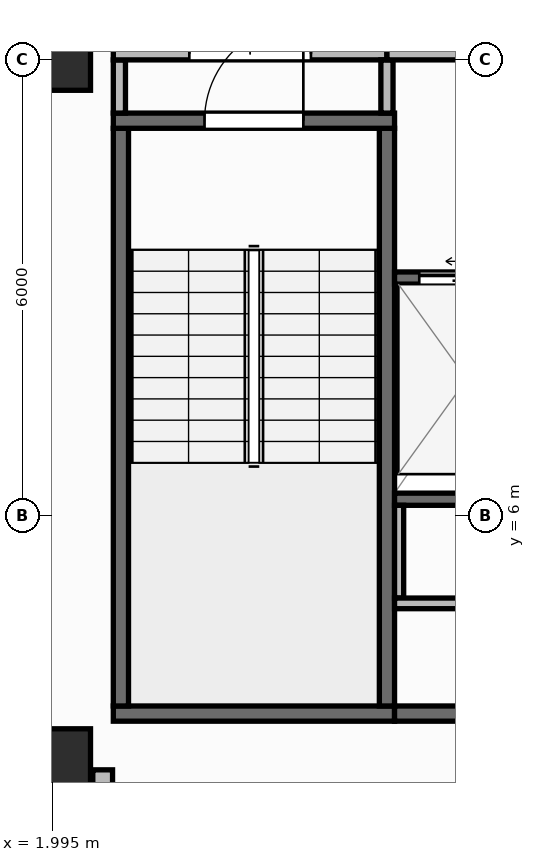
"""IFC4 building model, lengths in metres.
Left out: names, types, materials, properties, quantities, classifications, styles, units other than length and angle.
Written with IfcOpenShell. Run it as: python <this file> out.ifc"""

import sys

from ifc_helpers import new_model, si_unit, direction, frame, frame_2d, origin, origin_2d, place, context, subcontext, project, spatial, rectangle, extrude, element, fill, save


model = new_model("IFC4")
c1 = context("Model", 3, precision=1e-05, world=origin(), true_north=direction((0.0, 1.0)))
c2 = subcontext(c1, "Body", "Model", "MODEL_VIEW")
j1 = project(units=[si_unit("LENGTHUNIT", "METRE"), si_unit("PLANEANGLEUNIT", "RADIAN")], contexts=[c1])
p1 = place(None, origin())
s1 = spatial("IfcSite", under=j1, at=p1, CompositionType="ELEMENT")
p2 = place(p1, origin())
s2 = spatial("IfcBuilding", under=s1, at=p2, CompositionType="ELEMENT")
p3 = place(p2, frame((0.0, 0.0, 248.65)))
s3 = spatial("IfcBuildingStorey", under=s2, at=p3, CompositionType="ELEMENT", Elevation=248.65)
for number, where, z_axis, x_axis in (
    (1, (2.1, 2.8, 0.0), (0.0, 0.0, 1.0), (1.0, 0.0, 0.0)),
    (2, (2.1, 12.0, 0.0), (0.0, 0.0, 1.0), (1.0, 0.0, 0.0)),
):
    element("IfcColumn", number, at=place(p3, frame(where, z_axis=z_axis, x_axis=x_axis)), inside=s3, PredefinedType="COLUMN", context=c2, shape_type="SweptSolid", body=[
        extrude(rectangle(XDim=0.8, YDim=0.8, at=origin_2d()), origin(), (0.0, 0.0, 1.0), 3.95),
    ])
p4 = place(p3, frame((2.66, 2.66, 0.0), z_axis=(0.0, 0.0, 1.0), x_axis=(0.0, -1.0, 0.0)))
e3 = element("IfcWall", 3, at=p4, inside=s3, PredefinedType="STANDARD", context=c2, shape_type="SweptSolid", body=[
    extrude(rectangle(XDim=2.486, YDim=0.26, at=frame_2d((1.243, 0.0))), origin(), (0.0, 0.0, 1.0), 3.71),
])
p5 = place(p3, frame((2.66, 0.174, 0.0), z_axis=(0.0, 0.0, 1.0), x_axis=(0.996611813627, 0.082248969229, 0.0)))
e4 = element("IfcWall", 4, at=p5, inside=s3, PredefinedType="STANDARD", context=c2, shape_type="SweptSolid", body=[
    extrude(rectangle(XDim=41.019, YDim=0.26, at=frame_2d((20.51, 0.0))), origin(), (0.0, 0.0, 1.0), 3.71),
])
p6 = place(p5, frame((19.31, 0.0, 0.9)))
e5 = element("IfcOpeningElement", 5, at=p6, cuts=e4, PredefinedType="OPENING", context=c2, shape_type="SweptSolid", body=[
    extrude(rectangle(XDim=2.4, YDim=1.65, at=frame_2d((1.2, 0.825))), frame((0.0, 0.14, 0.0), z_axis=(0.0, -1.0, 0.0), x_axis=(1.0, 0.0, 0.0)), (0.0, 0.0, 1.0), 0.28),
])
p7 = place(p3, frame((2.8, 3.4, 0.0), z_axis=(0.0, 0.0, 1.0), x_axis=(1.0, 0.0, 0.0)))
e6 = element("IfcWall", 6, at=p7, inside=s3, PredefinedType="SHEAR", context=c2, shape_type="SweptSolid", body=[
    extrude(rectangle(XDim=3.7, YDim=0.2, at=frame_2d((1.85, 0.0))), origin(), (0.0, 0.0, 1.0), 3.71),
])
for number, where, z_axis, x_axis in (
    (7, (2.9, 3.5, 0.0), (0.0, 0.0, 1.0), (0.0, 1.0, 0.0)),
    (8, (6.4, 3.5, 0.0), (0.0, 0.0, 1.0), (0.0, 1.0, 0.0)),
):
    element("IfcWall", number, at=place(p3, frame(where, z_axis=z_axis, x_axis=x_axis)), inside=s3, PredefinedType="SHEAR", context=c2, shape_type="SweptSolid", body=[
        extrude(rectangle(XDim=7.6, YDim=0.2, at=frame_2d((3.8, 0.0))), origin(), (0.0, 0.0, 1.0), 3.71),
    ])
p8 = place(p3, frame((2.8, 11.2, 0.0), z_axis=(0.0, 0.0, 1.0), x_axis=(1.0, 0.0, 0.0)))
e9 = element("IfcWall", 9, at=p8, inside=s3, PredefinedType="SHEAR", context=c2, shape_type="SweptSolid", body=[
    extrude(rectangle(XDim=3.7, YDim=0.2, at=frame_2d((1.85, 0.0))), origin(), (0.0, 0.0, 1.0), 3.71),
])
p9 = place(p8, frame((1.2, 0.0, 0.0)))
e10 = element("IfcOpeningElement", 10, at=p9, cuts=e9, PredefinedType="OPENING", context=c2, shape_type="SweptSolid", body=[
    extrude(rectangle(XDim=1.3, YDim=2.15, at=frame_2d((0.65, 1.075))), frame((0.0, 0.11, 0.0), z_axis=(0.0, -1.0, 0.0), x_axis=(1.0, 0.0, 0.0)), (0.0, 0.0, 1.0), 0.22),
])
p10 = place(p3, frame((6.5, 3.4, 0.0), z_axis=(0.0, 0.0, 1.0), x_axis=(1.0, 0.0, 0.0)))
e11 = element("IfcWall", 11, at=p10, inside=s3, PredefinedType="SHEAR", context=c2, shape_type="SweptSolid", body=[
    extrude(rectangle(XDim=13.7, YDim=0.2, at=frame_2d((6.85, 0.0))), origin(), (0.0, 0.0, 1.0), 3.71),
])
p11 = place(p3, frame((6.5, 6.22, 0.0), z_axis=(0.0, 0.0, 1.0), x_axis=(1.0, 0.0, 0.0)))
e12 = element("IfcWall", 12, at=p11, inside=s3, PredefinedType="SHEAR", context=c2, shape_type="SweptSolid", body=[
    extrude(rectangle(XDim=12.11, YDim=0.16, at=frame_2d((6.055, 0.0))), origin(), (0.0, 0.0, 1.0), 3.71),
])
p12 = place(p3, frame((6.5, 9.13, 0.0), z_axis=(0.0, 0.0, 1.0), x_axis=(1.0, 0.0, 0.0)))
e13 = element("IfcWall", 13, at=p12, inside=s3, PredefinedType="SHEAR", context=c2, shape_type="SweptSolid", body=[
    extrude(rectangle(XDim=1.975, YDim=0.16, at=frame_2d((0.988, 0.0))), origin(), (0.0, 0.0, 1.0), 3.71),
])
p13 = place(p12, frame((0.325, 0.0, 0.0)))
e14 = element("IfcOpeningElement", 14, at=p13, cuts=e13, PredefinedType="OPENING", context=c2, shape_type="SweptSolid", body=[
    extrude(rectangle(XDim=1.25, YDim=2.15, at=frame_2d((0.625, 1.075))), frame((0.0, 0.09, 0.0), z_axis=(0.0, -1.0, 0.0), x_axis=(1.0, 0.0, 0.0)), (0.0, 0.0, 1.0), 0.18),
])
p14 = place(p3, frame((6.56, 4.92, 0.0), z_axis=(0.0, 0.0, 1.0), x_axis=(0.0, 1.0, 0.0)))
e15 = element("IfcWall", 15, at=p14, inside=s3, PredefinedType="PARTITIONING", context=c2, shape_type="SweptSolid", body=[
    extrude(rectangle(XDim=1.22, YDim=0.12, at=frame_2d((0.61, 0.0))), origin(), (0.0, 0.0, 1.0), 3.71),
])
p15 = place(p3, frame((6.5, 4.85, 0.0), z_axis=(0.0, 0.0, 1.0), x_axis=(1.0, 0.0, 0.0)))
e16 = element("IfcWall", 16, at=p15, inside=s3, PredefinedType="PARTITIONING", context=c2, shape_type="SweptSolid", body=[
    extrude(rectangle(XDim=12.1, YDim=0.14, at=frame_2d((6.05, 0.0))), origin(), (0.0, 0.0, 1.0), 3.71),
])
p16 = place(p15, frame((5.5, 0.0, 0.0)))
e17 = element("IfcOpeningElement", 17, at=p16, cuts=e16, PredefinedType="OPENING", context=c2, shape_type="SweptSolid", body=[
    extrude(rectangle(XDim=1.1, YDim=2.1, at=frame_2d((0.55, 1.05))), frame((0.0, 0.08, 0.0), z_axis=(0.0, -1.0, 0.0), x_axis=(1.0, 0.0, 0.0)), (0.0, 0.0, 1.0), 0.16),
])
p17 = place(p3, frame((2.88, 11.3, 0.0), z_axis=(0.0, 0.0, 1.0), x_axis=(0.0, 1.0, 0.0)))
e18 = element("IfcWall", 18, at=p17, inside=s3, PredefinedType="PARTITIONING", context=c2, shape_type="SweptSolid", body=[
    extrude(rectangle(XDim=0.7, YDim=0.16, at=frame_2d((0.35, 0.0))), origin(), (0.0, 0.0, 1.0), 3.71),
])
p18 = place(p3, frame((2.8, 12.08, 0.0), z_axis=(0.0, 0.0, 1.0), x_axis=(1.0, 0.0, 0.0)))
e19 = element("IfcWall", 19, at=p18, inside=s3, PredefinedType="PARTITIONING", context=c2, shape_type="SweptSolid", body=[
    extrude(rectangle(XDim=3.6, YDim=0.16, at=frame_2d((1.8, 0.0))), origin(), (0.0, 0.0, 1.0), 3.157),
])
p19 = place(p18, frame((1.0, 0.0, 0.0)))
e20 = element("IfcOpeningElement", 20, at=p19, cuts=e19, PredefinedType="OPENING", context=c2, shape_type="SweptSolid", body=[
    extrude(rectangle(XDim=1.6, YDim=2.05, at=frame_2d((0.8, 1.025))), frame((0.0, 0.09, 0.0), z_axis=(0.0, -1.0, 0.0), x_axis=(1.0, 0.0, 0.0)), (0.0, 0.0, 1.0), 0.18),
])
p20 = place(p3, frame((6.4, 11.3, 0.0), z_axis=(0.0, 0.0, 1.0), x_axis=(0.0, 1.0, 0.0)))
e21 = element("IfcWall", 21, at=p20, inside=s3, PredefinedType="PARTITIONING", context=c2, shape_type="SweptSolid", body=[
    extrude(rectangle(XDim=0.7, YDim=0.16, at=frame_2d((0.35, 0.0))), origin(), (0.0, 0.0, 1.0), 3.71),
])
p21 = place(p3, frame((6.4, 12.08, 0.0), z_axis=(0.0, 0.0, 1.0), x_axis=(1.0, 0.0, 0.0)))
e22 = element("IfcWall", 22, at=p21, inside=s3, PredefinedType="PARTITIONING", context=c2, shape_type="SweptSolid", body=[
    extrude(rectangle(XDim=6.18, YDim=0.16, at=frame_2d((3.09, 0.0))), origin(), (0.0, 0.0, 1.0), 3.157),
])
p22 = place(p21, frame((2.29, 0.0, 0.0)))
e23 = element("IfcOpeningElement", 23, at=p22, cuts=e22, PredefinedType="OPENING", context=c2, shape_type="SweptSolid", body=[
    extrude(rectangle(XDim=1.6, YDim=2.05, at=frame_2d((0.8, 1.025))), frame((0.0, 0.09, 0.0), z_axis=(0.0, -1.0, 0.0), x_axis=(1.0, 0.0, 0.0)), (0.0, 0.0, 1.0), 0.18),
])
p23 = place(p9, origin())
e24 = element("IfcDoor", 24, at=p23, inside=s3, OperationType="SINGLE_SWING_RIGHT", PredefinedType="DOOR", context=c2, shape_type="SweptSolid", body=[
    extrude(rectangle(XDim=1.3, YDim=2.15, at=frame_2d((0.65, 1.075))), frame((0.0, 0.025, 0.0), z_axis=(0.0, -1.0, 0.0), x_axis=(1.0, 0.0, 0.0)), (0.0, 0.0, 1.0), 0.05),
])
fill(e10, e24)
p24 = place(p13, origin())
e25 = element("IfcDoor", 25, at=p24, inside=s3, OperationType="SLIDING_TO_LEFT", PredefinedType="DOOR", context=c2, shape_type="SweptSolid", body=[
    extrude(rectangle(XDim=1.25, YDim=2.15, at=frame_2d((0.625, 1.075))), frame((0.0, 0.025, 0.0), z_axis=(0.0, -1.0, 0.0), x_axis=(1.0, 0.0, 0.0)), (0.0, 0.0, 1.0), 0.05),
])
fill(e14, e25)
p25 = place(p19, origin())
e26 = element("IfcDoor", 26, at=p25, inside=s3, OperationType="DOUBLE_DOOR_SINGLE_SWING", PredefinedType="DOOR", context=c2, shape_type="SweptSolid", body=[
    extrude(rectangle(XDim=1.6, YDim=2.05, at=frame_2d((0.8, 1.025))), frame((0.0, 0.025, 0.0), z_axis=(0.0, -1.0, 0.0), x_axis=(1.0, 0.0, 0.0)), (0.0, 0.0, 1.0), 0.05),
])
fill(e20, e26)
save(model, sys.argv[1])
